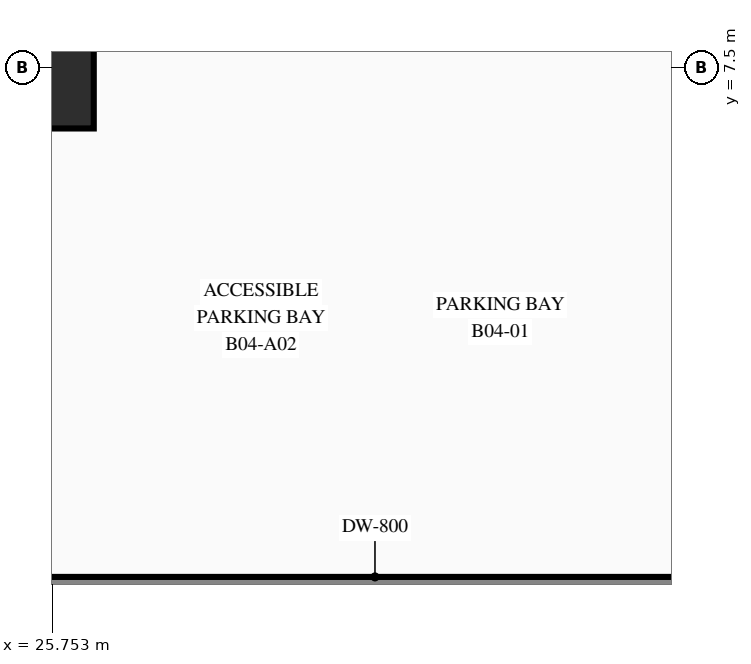
"""IFC4 building model, lengths in metres.
Left out: names, types, materials, properties, quantities, classifications, styles, units other than length and angle.
Written with IfcOpenShell. Run it as: python <this file> out.ifc"""

import sys

from ifc_helpers import new_model, si_unit, direction, frame, frame_2d, origin, origin_2d, place, context, subcontext, project, spatial, rectangle, extrude, element, save


model = new_model("IFC4")
c1 = context("Model", 3, precision=1e-05, world=origin(), true_north=direction((0.0, 1.0)))
c2 = subcontext(c1, "Body", "Model", "MODEL_VIEW")
j1 = project(units=[si_unit("LENGTHUNIT", "METRE"), si_unit("PLANEANGLEUNIT", "RADIAN")], contexts=[c1])
p1 = place(None, origin())
s1 = spatial("IfcSite", under=j1, at=p1, CompositionType="ELEMENT")
p2 = place(p1, origin())
s2 = spatial("IfcBuilding", under=s1, at=p2, CompositionType="ELEMENT")
p3 = place(p2, frame((0.0, 0.0, -18.0)))
s3 = spatial("IfcBuildingStorey", under=s2, at=p3, CompositionType="ELEMENT", Elevation=-18.0)
p4 = place(p3, frame((0.0, 0.4, 0.0), z_axis=(0.0, 0.0, 1.0), x_axis=(1.0, 0.0, 0.0)))
e1 = element("IfcWall", 1, at=p4, inside=s3, PredefinedType="USERDEFINED", context=c2, shape_type="SweptSolid", body=[
    extrude(rectangle(XDim=60.0, YDim=0.8, at=frame_2d((30.0, 0.0))), origin(), (0.0, 0.0, 1.0), 4.5),
])
p5 = place(p3, frame((25.5, 7.5, 0.0), z_axis=(0.0, 0.0, 1.0), x_axis=(1.0, 0.0, 0.0)))
e2 = element("IfcColumn", 2, at=p5, inside=s3, PredefinedType="COLUMN", context=c2, shape_type="SweptSolid", body=[
    extrude(rectangle(XDim=1.6, YDim=1.6, at=origin_2d()), origin(), (0.0, 0.0, 1.0), 4.5),
])
save(model, sys.argv[1])
